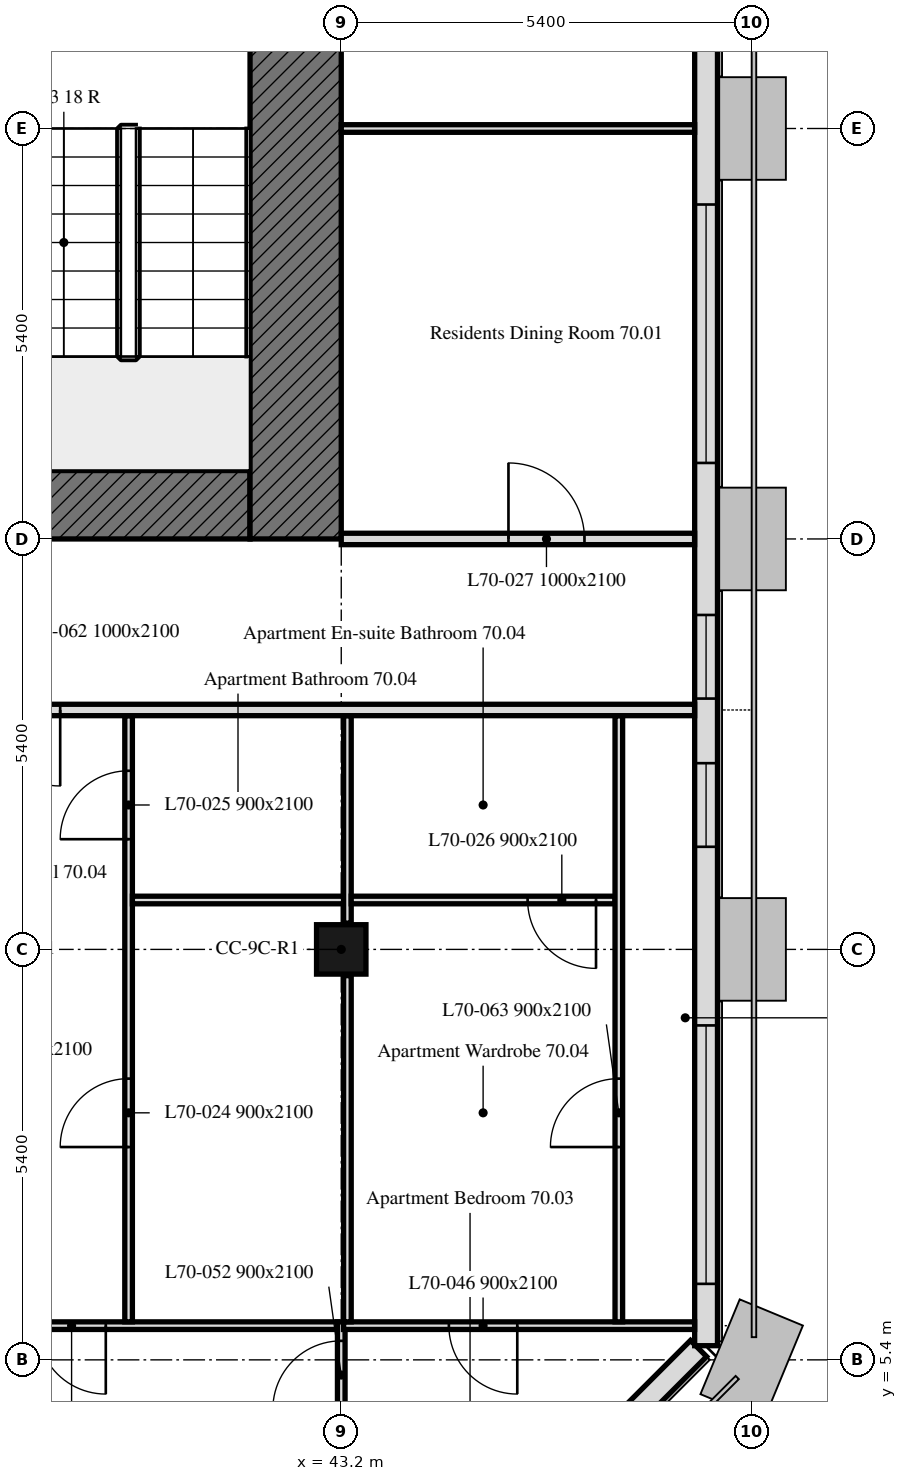
"""IFC4 building model, lengths in metres.
Left out: names, types, materials, properties, quantities, classifications, styles, units other than length and angle.
Written with IfcOpenShell. Run it as: python <this file> out.ifc"""

import sys

from ifc_helpers import new_model, si_unit, direction, frame, frame_2d, origin, origin_2d, place, context, subcontext, project, spatial, rectangle, extrude, element, fill, save


model = new_model("IFC4")
c1 = context("Model", 3, precision=1e-05, world=origin(), true_north=direction((0.0, 1.0)))
c2 = subcontext(c1, "Body", "Model", "MODEL_VIEW")
j1 = project(units=[si_unit("LENGTHUNIT", "METRE"), si_unit("PLANEANGLEUNIT", "RADIAN")], contexts=[c1])
p1 = place(None, origin())
s1 = spatial("IfcSite", under=j1, at=p1, CompositionType="ELEMENT")
p2 = place(p1, origin())
s2 = spatial("IfcBuilding", under=s1, at=p2, CompositionType="ELEMENT")
p3 = place(p2, frame((0.0, 0.0, 285.1)))
s3 = spatial("IfcBuildingStorey", under=s2, at=p3, CompositionType="ELEMENT", Elevation=285.1)
p4 = place(p3, frame((43.2, 10.8, 0.0), z_axis=(0.0, 0.0, 1.0), x_axis=(1.0, 0.0, 0.0)))
e1 = element("IfcColumn", 1, at=p4, inside=s3, PredefinedType="COLUMN", context=c2, shape_type="SweptSolid", body=[
    extrude(rectangle(XDim=0.65, YDim=0.65, at=origin_2d()), origin(), (0.0, 0.0, 1.0), 3.0),
])
p5 = place(p3, frame((43.051, 0.699, 0.0), z_axis=(0.0, 0.0, 1.0), x_axis=(0.707106781187, 0.707106781187, 0.0)))
e2 = element("IfcWall", 2, at=p5, inside=s3, PredefinedType="SOLIDWALL", context=c2, shape_type="SweptSolid", body=[
    extrude(rectangle(XDim=6.86, YDim=0.3, at=frame_2d((3.43, 0.0))), origin(), (0.0, 0.0, 1.0), 3.0),
])
p6 = place(p5, frame((1.73, 0.0, 0.9)))
e3 = element("IfcOpeningElement", 3, at=p6, cuts=e2, PredefinedType="OPENING", context=c2, shape_type="SweptSolid", body=[
    extrude(rectangle(XDim=3.4, YDim=1.7, at=frame_2d((1.7, 0.85))), frame((0.0, 0.16, 0.0), z_axis=(0.0, -1.0, 0.0), x_axis=(1.0, 0.0, 0.0)), (0.0, 0.0, 1.0), 0.32),
])
p7 = place(p3, frame((48.0, 5.586, 0.0), z_axis=(0.0, 0.0, 1.0), x_axis=(0.0, 1.0, 0.0)))
e4 = element("IfcWall", 4, at=p7, inside=s3, PredefinedType="SOLIDWALL", context=c2, shape_type="SweptSolid", body=[
    extrude(rectangle(XDim=32.027, YDim=0.3, at=frame_2d((16.014, 0.0))), origin(), (0.0, 0.0, 1.0), 3.0),
])
p8 = place(p7, frame((0.814, 0.0, 0.9)))
e5 = element("IfcOpeningElement", 5, at=p8, cuts=e4, PredefinedType="OPENING", context=c2, shape_type="SweptSolid", body=[
    extrude(rectangle(XDim=3.4, YDim=1.7, at=frame_2d((1.7, 0.85))), frame((0.0, 0.16, 0.0), z_axis=(0.0, -1.0, 0.0), x_axis=(1.0, 0.0, 0.0)), (0.0, 0.0, 1.0), 0.32),
])
p9 = place(p7, frame((6.564, 0.0, 0.9)))
e6 = element("IfcOpeningElement", 6, at=p9, cuts=e4, PredefinedType="OPENING", context=c2, shape_type="SweptSolid", body=[
    extrude(rectangle(XDim=1.1, YDim=1.7, at=frame_2d((0.55, 0.85))), frame((0.0, 0.16, 0.0), z_axis=(0.0, -1.0, 0.0), x_axis=(1.0, 0.0, 0.0)), (0.0, 0.0, 1.0), 0.32),
])
p10 = place(p7, frame((8.514, 0.0, 0.9)))
e7 = element("IfcOpeningElement", 7, at=p10, cuts=e4, PredefinedType="OPENING", context=c2, shape_type="SweptSolid", body=[
    extrude(rectangle(XDim=1.1, YDim=1.7, at=frame_2d((0.55, 0.85))), frame((0.0, 0.16, 0.0), z_axis=(0.0, -1.0, 0.0), x_axis=(1.0, 0.0, 0.0)), (0.0, 0.0, 1.0), 0.32),
])
p11 = place(p7, frame((11.614, 0.0, 0.9)))
e8 = element("IfcOpeningElement", 8, at=p11, cuts=e4, PredefinedType="OPENING", context=c2, shape_type="SweptSolid", body=[
    extrude(rectangle(XDim=3.4, YDim=1.7, at=frame_2d((1.7, 0.85))), frame((0.0, 0.16, 0.0), z_axis=(0.0, -1.0, 0.0), x_axis=(1.0, 0.0, 0.0)), (0.0, 0.0, 1.0), 0.32),
])
p12 = place(p7, frame((17.364, 0.0, 0.9)))
e9 = element("IfcOpeningElement", 9, at=p12, cuts=e4, PredefinedType="OPENING", context=c2, shape_type="SweptSolid", body=[
    extrude(rectangle(XDim=1.1, YDim=1.7, at=frame_2d((0.55, 0.85))), frame((0.0, 0.16, 0.0), z_axis=(0.0, -1.0, 0.0), x_axis=(1.0, 0.0, 0.0)), (0.0, 0.0, 1.0), 0.32),
])
p13 = place(p7, frame((18.964, 0.0, 0.9)))
e10 = element("IfcOpeningElement", 10, at=p13, cuts=e4, PredefinedType="OPENING", context=c2, shape_type="SweptSolid", body=[
    extrude(rectangle(XDim=1.1, YDim=1.7, at=frame_2d((0.55, 0.85))), frame((0.0, 0.16, 0.0), z_axis=(0.0, -1.0, 0.0), x_axis=(1.0, 0.0, 0.0)), (0.0, 0.0, 1.0), 0.32),
])
p14 = place(p7, frame((22.414, 0.0, 0.9)))
e11 = element("IfcOpeningElement", 11, at=p14, cuts=e4, PredefinedType="OPENING", context=c2, shape_type="SweptSolid", body=[
    extrude(rectangle(XDim=3.4, YDim=1.7, at=frame_2d((1.7, 0.85))), frame((0.0, 0.16, 0.0), z_axis=(0.0, -1.0, 0.0), x_axis=(1.0, 0.0, 0.0)), (0.0, 0.0, 1.0), 0.32),
])
p15 = place(p7, frame((28.239, 0.0, 0.9)))
e12 = element("IfcOpeningElement", 12, at=p15, cuts=e4, PredefinedType="OPENING", context=c2, shape_type="SweptSolid", body=[
    extrude(rectangle(XDim=0.65, YDim=1.7, at=frame_2d((0.325, 0.85))), frame((0.0, 0.16, 0.0), z_axis=(0.0, -1.0, 0.0), x_axis=(1.0, 0.0, 0.0)), (0.0, 0.0, 1.0), 0.32),
])
p16 = place(p7, frame((29.764, 0.0, 0.9)))
e13 = element("IfcOpeningElement", 13, at=p16, cuts=e4, PredefinedType="OPENING", context=c2, shape_type="SweptSolid", body=[
    extrude(rectangle(XDim=1.1, YDim=1.7, at=frame_2d((0.55, 0.85))), frame((0.0, 0.16, 0.0), z_axis=(0.0, -1.0, 0.0), x_axis=(1.0, 0.0, 0.0)), (0.0, 0.0, 1.0), 0.32),
])
p17 = place(p3, frame((42.0, 16.65, 0.0), z_axis=(0.0, 0.0, 1.0), x_axis=(-1.0, 0.0, 0.0)))
e14 = element("IfcWall", 14, at=p17, inside=s3, PredefinedType="SOLIDWALL", context=c2, shape_type="SweptSolid", body=[
    extrude(rectangle(XDim=11.1, YDim=0.9, at=frame_2d((5.55, 0.0))), origin(), (0.0, 0.0, 1.0), 3.0),
])
p18 = place(p17, frame((3.55, 0.0, 0.0)))
e15 = element("IfcOpeningElement", 15, at=p18, cuts=e14, PredefinedType="OPENING", context=c2, shape_type="SweptSolid", body=[
    extrude(rectangle(XDim=2.0, YDim=2.4, at=frame_2d((1.0, 1.2))), frame((0.0, 0.45, 0.0), z_axis=(0.0, -1.0, 0.0), x_axis=(1.0, 0.0, 0.0)), (0.0, 0.0, 1.0), 0.9),
])
p19 = place(p3, frame((42.6, 32.4, 0.0), z_axis=(0.0, 0.0, 1.0), x_axis=(0.0, -1.0, 0.0)))
e16 = element("IfcWall", 16, at=p19, inside=s3, PredefinedType="SOLIDWALL", context=c2, shape_type="SweptSolid", body=[
    extrude(rectangle(XDim=16.2, YDim=1.2, at=frame_2d((8.1, 0.0))), origin(), (0.0, 0.0, 1.0), 3.0),
])
p20 = place(p3, frame((43.2, 21.6, 0.0), z_axis=(0.0, 0.0, 1.0), x_axis=(1.0, 0.0, 0.0)))
e17 = element("IfcWall", 17, at=p20, inside=s3, PredefinedType="PARTITIONING", context=c2, shape_type="SweptSolid", body=[
    extrude(rectangle(XDim=4.649, YDim=0.1, at=frame_2d((2.325, 0.0))), origin(), (0.0, 0.0, 1.0), 2.4),
])
p21 = place(p3, frame((43.2, 1.112, 0.0), z_axis=(0.0, 0.0, 1.0), x_axis=(0.0, 1.0, 0.0)))
e18 = element("IfcWall", 18, at=p21, inside=s3, PredefinedType="PARTITIONING", context=c2, shape_type="SweptSolid", body=[
    extrude(rectangle(XDim=4.788, YDim=0.1, at=frame_2d((2.394, 0.0))), origin(), (0.0, 0.0, 1.0), 3.0),
])
p22 = place(p21, frame((3.638, 0.0, 0.0)))
e19 = element("IfcOpeningElement", 19, at=p22, cuts=e18, PredefinedType="OPENING", context=c2, shape_type="SweptSolid", body=[
    extrude(rectangle(XDim=0.9, YDim=2.1, at=frame_2d((0.45, 1.05))), frame((0.0, 0.05, 0.0), z_axis=(0.0, -1.0, 0.0), x_axis=(1.0, 0.0, 0.0)), (0.0, 0.0, 1.0), 0.1),
])
p23 = place(p3, frame((43.15, 5.85, 0.0), z_axis=(0.0, 0.0, 1.0), x_axis=(-1.0, 0.0, 0.0)))
e20 = element("IfcWall", 20, at=p23, inside=s3, PredefinedType="PARTITIONING", context=c2, shape_type="SweptSolid", body=[
    extrude(rectangle(XDim=5.35, YDim=0.1, at=frame_2d((2.675, 0.0))), origin(), (0.0, 0.0, 1.0), 3.0),
])
p24 = place(p23, frame((3.048, 0.0, 0.0)))
e21 = element("IfcOpeningElement", 21, at=p24, cuts=e20, PredefinedType="OPENING", context=c2, shape_type="SweptSolid", body=[
    extrude(rectangle(XDim=0.9, YDim=2.1, at=frame_2d((0.45, 1.05))), frame((0.0, 0.05, 0.0), z_axis=(0.0, -1.0, 0.0), x_axis=(1.0, 0.0, 0.0)), (0.0, 0.0, 1.0), 0.1),
])
p25 = place(p3, frame((47.849, 5.85, 0.0), z_axis=(0.0, 0.0, 1.0), x_axis=(-1.0, 0.0, 0.0)))
e22 = element("IfcWall", 22, at=p25, inside=s3, PredefinedType="PARTITIONING", context=c2, shape_type="SweptSolid", body=[
    extrude(rectangle(XDim=4.618, YDim=0.1, at=frame_2d((2.309, 0.0))), origin(), (0.0, 0.0, 1.0), 3.0),
])
p26 = place(p25, frame((2.333, 0.0, 0.0)))
e23 = element("IfcOpeningElement", 23, at=p26, cuts=e22, PredefinedType="OPENING", context=c2, shape_type="SweptSolid", body=[
    extrude(rectangle(XDim=0.9, YDim=2.1, at=frame_2d((0.45, 1.05))), frame((0.0, 0.05, 0.0), z_axis=(0.0, -1.0, 0.0), x_axis=(1.0, 0.0, 0.0)), (0.0, 0.0, 1.0), 0.1),
])
p27 = place(p3, frame((40.402, 5.9, 0.0), z_axis=(0.0, 0.0, 1.0), x_axis=(0.0, 1.0, 0.0)))
e24 = element("IfcWall", 24, at=p27, inside=s3, PredefinedType="PARTITIONING", context=c2, shape_type="SweptSolid", body=[
    extrude(rectangle(XDim=7.975, YDim=0.1, at=frame_2d((3.988, 0.0))), origin(), (0.0, 0.0, 1.0), 2.4),
])
p28 = place(p27, frame((2.3, 0.0, 0.0)))
e25 = element("IfcOpeningElement", 25, at=p28, cuts=e24, PredefinedType="OPENING", context=c2, shape_type="SweptSolid", body=[
    extrude(rectangle(XDim=0.9, YDim=2.1, at=frame_2d((0.45, 1.05))), frame((0.0, 0.05, 0.0), z_axis=(0.0, -1.0, 0.0), x_axis=(1.0, 0.0, 0.0)), (0.0, 0.0, 1.0), 0.1),
])
p29 = place(p27, frame((6.35, 0.0, 0.0)))
e26 = element("IfcOpeningElement", 26, at=p29, cuts=e24, PredefinedType="OPENING", context=c2, shape_type="SweptSolid", body=[
    extrude(rectangle(XDim=0.9, YDim=2.1, at=frame_2d((0.45, 1.05))), frame((0.0, 0.05, 0.0), z_axis=(0.0, -1.0, 0.0), x_axis=(1.0, 0.0, 0.0)), (0.0, 0.0, 1.0), 0.1),
])
p30 = place(p3, frame((43.281, 5.9, 0.0), z_axis=(0.0, 0.0, 1.0), x_axis=(0.0, 1.0, 0.0)))
e27 = element("IfcWall", 27, at=p30, inside=s3, PredefinedType="PARTITIONING", context=c2, shape_type="SweptSolid", body=[
    extrude(rectangle(XDim=4.555, YDim=0.1, at=frame_2d((2.278, 0.0))), origin(), (0.0, 0.0, 1.0), 3.0),
])
p31 = place(p3, frame((43.231, 11.45, 0.0), z_axis=(0.0, 0.0, 1.0), x_axis=(-1.0, 0.0, 0.0)))
e28 = element("IfcWall", 28, at=p31, inside=s3, PredefinedType="PARTITIONING", context=c2, shape_type="SweptSolid", body=[
    extrude(rectangle(XDim=2.779, YDim=0.1, at=frame_2d((1.39, 0.0))), origin(), (0.0, 0.0, 1.0), 3.0),
])
p32 = place(p3, frame((43.281, 11.145, 0.0), z_axis=(0.0, 0.0, 1.0), x_axis=(0.0, 1.0, 0.0)))
e29 = element("IfcWall", 29, at=p32, inside=s3, PredefinedType="PARTITIONING", context=c2, shape_type="SweptSolid", body=[
    extrude(rectangle(XDim=2.73, YDim=0.1, at=frame_2d((1.365, 0.0))), origin(), (0.0, 0.0, 1.0), 3.0),
])
p33 = place(p3, frame((46.802, 11.45, 0.0), z_axis=(0.0, 0.0, 1.0), x_axis=(-1.0, 0.0, 0.0)))
e30 = element("IfcWall", 30, at=p33, inside=s3, PredefinedType="PARTITIONING", context=c2, shape_type="SweptSolid", body=[
    extrude(rectangle(XDim=3.471, YDim=0.1, at=frame_2d((1.735, 0.0))), origin(), (0.0, 0.0, 1.0), 3.0),
])
p34 = place(p33, frame((0.25, 0.0, 0.0)))
e31 = element("IfcOpeningElement", 31, at=p34, cuts=e30, PredefinedType="OPENING", context=c2, shape_type="SweptSolid", body=[
    extrude(rectangle(XDim=0.9, YDim=2.1, at=frame_2d((0.45, 1.05))), frame((0.0, 0.05, 0.0), z_axis=(0.0, -1.0, 0.0), x_axis=(1.0, 0.0, 0.0)), (0.0, 0.0, 1.0), 0.1),
])
p35 = place(p3, frame((46.852, 5.9, 0.0), z_axis=(0.0, 0.0, 1.0), x_axis=(0.0, 1.0, 0.0)))
e32 = element("IfcWall", 32, at=p35, inside=s3, PredefinedType="PARTITIONING", context=c2, shape_type="SweptSolid", body=[
    extrude(rectangle(XDim=7.975, YDim=0.1, at=frame_2d((3.988, 0.0))), origin(), (0.0, 0.0, 1.0), 2.4),
])
p36 = place(p35, frame((2.3, 0.0, 0.0)))
e33 = element("IfcOpeningElement", 33, at=p36, cuts=e32, PredefinedType="OPENING", context=c2, shape_type="SweptSolid", body=[
    extrude(rectangle(XDim=0.9, YDim=2.1, at=frame_2d((0.45, 1.05))), frame((0.0, 0.05, 0.0), z_axis=(0.0, -1.0, 0.0), x_axis=(1.0, 0.0, 0.0)), (0.0, 0.0, 1.0), 0.1),
])
p37 = place(p3, frame((47.849, 13.95, 0.0), z_axis=(0.0, 0.0, 1.0), x_axis=(-1.0, 0.0, 0.0)))
e34 = element("IfcWall", 34, at=p37, inside=s3, PredefinedType="PARTITIONING", context=c2, shape_type="SweptSolid", body=[
    extrude(rectangle(XDim=41.698, YDim=0.15, at=frame_2d((20.849, 0.0))), origin(), (0.0, 0.0, 1.0), 2.4),
])
p38 = place(p37, frame((37.749, 0.0, 0.0)))
e35 = element("IfcOpeningElement", 35, at=p38, cuts=e34, PredefinedType="OPENING", context=c2, shape_type="SweptSolid", body=[
    extrude(rectangle(XDim=1.0, YDim=2.1, at=frame_2d((0.5, 1.05))), frame((0.0, 0.075, 0.0), z_axis=(0.0, -1.0, 0.0), x_axis=(1.0, 0.0, 0.0)), (0.0, 0.0, 1.0), 0.15),
])
p39 = place(p37, frame((32.244, 0.0, 0.0)))
e36 = element("IfcOpeningElement", 36, at=p39, cuts=e34, PredefinedType="OPENING", context=c2, shape_type="SweptSolid", body=[
    extrude(rectangle(XDim=1.0, YDim=2.1, at=frame_2d((0.5, 1.05))), frame((0.0, 0.075, 0.0), z_axis=(0.0, -1.0, 0.0), x_axis=(1.0, 0.0, 0.0)), (0.0, 0.0, 1.0), 0.15),
])
p40 = place(p37, frame((27.735, 0.0, 0.0)))
e37 = element("IfcOpeningElement", 37, at=p40, cuts=e34, PredefinedType="OPENING", context=c2, shape_type="SweptSolid", body=[
    extrude(rectangle(XDim=1.0, YDim=2.1, at=frame_2d((0.5, 1.05))), frame((0.0, 0.075, 0.0), z_axis=(0.0, -1.0, 0.0), x_axis=(1.0, 0.0, 0.0)), (0.0, 0.0, 1.0), 0.15),
])
p41 = place(p37, frame((8.347, 0.0, 0.0)))
e38 = element("IfcOpeningElement", 38, at=p41, cuts=e34, PredefinedType="OPENING", context=c2, shape_type="SweptSolid", body=[
    extrude(rectangle(XDim=1.0, YDim=2.1, at=frame_2d((0.5, 1.05))), frame((0.0, 0.075, 0.0), z_axis=(0.0, -1.0, 0.0), x_axis=(1.0, 0.0, 0.0)), (0.0, 0.0, 1.0), 0.15),
])
p42 = place(p3, frame((43.2, 16.2, 0.0), z_axis=(0.0, 0.0, 1.0), x_axis=(1.0, 0.0, 0.0)))
e39 = element("IfcWall", 39, at=p42, inside=s3, PredefinedType="PARTITIONING", context=c2, shape_type="SweptSolid", body=[
    extrude(rectangle(XDim=4.649, YDim=0.15, at=frame_2d((2.325, 0.0))), origin(), (0.0, 0.0, 1.0), 2.4),
])
p43 = place(p42, frame((2.2, 0.0, 0.0)))
e40 = element("IfcOpeningElement", 40, at=p43, cuts=e39, PredefinedType="OPENING", context=c2, shape_type="SweptSolid", body=[
    extrude(rectangle(XDim=1.0, YDim=2.1, at=frame_2d((0.5, 1.05))), frame((0.0, 0.075, 0.0), z_axis=(0.0, -1.0, 0.0), x_axis=(1.0, 0.0, 0.0)), (0.0, 0.0, 1.0), 0.15),
])
p44 = place(p8, origin())
e41 = element("IfcWindow", 41, at=p44, inside=s3, PartitioningType="SINGLE_PANEL", PredefinedType="WINDOW", context=c2, shape_type="SweptSolid", body=[
    extrude(rectangle(XDim=3.4, YDim=1.7, at=frame_2d((1.7, 0.85))), frame((0.0, 0.03, 0.0), z_axis=(0.0, -1.0, 0.0), x_axis=(1.0, 0.0, 0.0)), (0.0, 0.0, 1.0), 0.06),
])
fill(e5, e41)
p45 = place(p9, origin())
e42 = element("IfcWindow", 42, at=p45, inside=s3, PartitioningType="SINGLE_PANEL", PredefinedType="WINDOW", context=c2, shape_type="SweptSolid", body=[
    extrude(rectangle(XDim=1.1, YDim=1.7, at=frame_2d((0.55, 0.85))), frame((0.0, 0.03, 0.0), z_axis=(0.0, -1.0, 0.0), x_axis=(1.0, 0.0, 0.0)), (0.0, 0.0, 1.0), 0.06),
])
fill(e6, e42)
p46 = place(p10, origin())
e43 = element("IfcWindow", 43, at=p46, inside=s3, PartitioningType="SINGLE_PANEL", PredefinedType="WINDOW", context=c2, shape_type="SweptSolid", body=[
    extrude(rectangle(XDim=1.1, YDim=1.7, at=frame_2d((0.55, 0.85))), frame((0.0, 0.03, 0.0), z_axis=(0.0, -1.0, 0.0), x_axis=(1.0, 0.0, 0.0)), (0.0, 0.0, 1.0), 0.06),
])
fill(e7, e43)
p47 = place(p11, origin())
e44 = element("IfcWindow", 44, at=p47, inside=s3, PartitioningType="SINGLE_PANEL", PredefinedType="WINDOW", context=c2, shape_type="SweptSolid", body=[
    extrude(rectangle(XDim=3.4, YDim=1.7, at=frame_2d((1.7, 0.85))), frame((0.0, 0.03, 0.0), z_axis=(0.0, -1.0, 0.0), x_axis=(1.0, 0.0, 0.0)), (0.0, 0.0, 1.0), 0.06),
])
fill(e8, e44)
p48 = place(p28, origin())
e45 = element("IfcDoor", 45, at=p48, inside=s3, OperationType="SINGLE_SWING_RIGHT", PredefinedType="DOOR", context=c2, shape_type="SweptSolid", body=[
    extrude(rectangle(XDim=0.9, YDim=2.1, at=frame_2d((0.45, 1.05))), frame((0.0, 0.025, 0.0), z_axis=(0.0, -1.0, 0.0), x_axis=(1.0, 0.0, 0.0)), (0.0, 0.0, 1.0), 0.05),
])
fill(e25, e45)
p49 = place(p29, origin())
e46 = element("IfcDoor", 46, at=p49, inside=s3, OperationType="SINGLE_SWING_RIGHT", PredefinedType="DOOR", context=c2, shape_type="SweptSolid", body=[
    extrude(rectangle(XDim=0.9, YDim=2.1, at=frame_2d((0.45, 1.05))), frame((0.0, 0.025, 0.0), z_axis=(0.0, -1.0, 0.0), x_axis=(1.0, 0.0, 0.0)), (0.0, 0.0, 1.0), 0.05),
])
fill(e26, e46)
p50 = place(p34, origin())
e47 = element("IfcDoor", 47, at=p50, inside=s3, OperationType="SINGLE_SWING_RIGHT", PredefinedType="DOOR", context=c2, shape_type="SweptSolid", body=[
    extrude(rectangle(XDim=0.9, YDim=2.1, at=frame_2d((0.45, 1.05))), frame((0.0, 0.025, 0.0), z_axis=(0.0, -1.0, 0.0), x_axis=(1.0, 0.0, 0.0)), (0.0, 0.0, 1.0), 0.05),
])
fill(e31, e47)
p51 = place(p43, origin())
e48 = element("IfcDoor", 48, at=p51, inside=s3, OperationType="SINGLE_SWING_RIGHT", PredefinedType="DOOR", context=c2, shape_type="SweptSolid", body=[
    extrude(rectangle(XDim=1.0, YDim=2.1, at=frame_2d((0.5, 1.05))), frame((0.0, 0.025, 0.0), z_axis=(0.0, -1.0, 0.0), x_axis=(1.0, 0.0, 0.0)), (0.0, 0.0, 1.0), 0.05),
])
fill(e40, e48)
p52 = place(p26, origin())
e49 = element("IfcDoor", 49, at=p52, inside=s3, OperationType="SINGLE_SWING_LEFT", PredefinedType="DOOR", context=c2, shape_type="SweptSolid", body=[
    extrude(rectangle(XDim=0.9, YDim=2.1, at=frame_2d((0.45, 1.05))), frame((0.0, 0.025, 0.0), z_axis=(0.0, -1.0, 0.0), x_axis=(1.0, 0.0, 0.0)), (0.0, 0.0, 1.0), 0.05),
])
fill(e23, e49)
p53 = place(p22, origin())
e50 = element("IfcDoor", 50, at=p53, inside=s3, OperationType="SINGLE_SWING_LEFT", PredefinedType="DOOR", context=c2, shape_type="SweptSolid", body=[
    extrude(rectangle(XDim=0.9, YDim=2.1, at=frame_2d((0.45, 1.05))), frame((0.0, 0.025, 0.0), z_axis=(0.0, -1.0, 0.0), x_axis=(1.0, 0.0, 0.0)), (0.0, 0.0, 1.0), 0.05),
])
fill(e19, e50)
p54 = place(p24, origin())
e51 = element("IfcDoor", 51, at=p54, inside=s3, OperationType="SINGLE_SWING_RIGHT", PredefinedType="DOOR", context=c2, shape_type="SweptSolid", body=[
    extrude(rectangle(XDim=0.9, YDim=2.1, at=frame_2d((0.45, 1.05))), frame((0.0, 0.025, 0.0), z_axis=(0.0, -1.0, 0.0), x_axis=(1.0, 0.0, 0.0)), (0.0, 0.0, 1.0), 0.05),
])
fill(e21, e51)
p55 = place(p41, origin())
e52 = element("IfcDoor", 52, at=p55, inside=s3, OperationType="SINGLE_SWING_LEFT", PredefinedType="DOOR", context=c2, shape_type="SweptSolid", body=[
    extrude(rectangle(XDim=1.0, YDim=2.1, at=frame_2d((0.5, 1.05))), frame((0.0, 0.025, 0.0), z_axis=(0.0, -1.0, 0.0), x_axis=(1.0, 0.0, 0.0)), (0.0, 0.0, 1.0), 0.05),
])
fill(e38, e52)
p56 = place(p36, origin())
e53 = element("IfcDoor", 53, at=p56, inside=s3, OperationType="SINGLE_SWING_LEFT", PredefinedType="DOOR", context=c2, shape_type="SweptSolid", body=[
    extrude(rectangle(XDim=0.9, YDim=2.1, at=frame_2d((0.45, 1.05))), frame((0.0, 0.025, 0.0), z_axis=(0.0, -1.0, 0.0), x_axis=(1.0, 0.0, 0.0)), (0.0, 0.0, 1.0), 0.05),
])
fill(e33, e53)
save(model, sys.argv[1])
